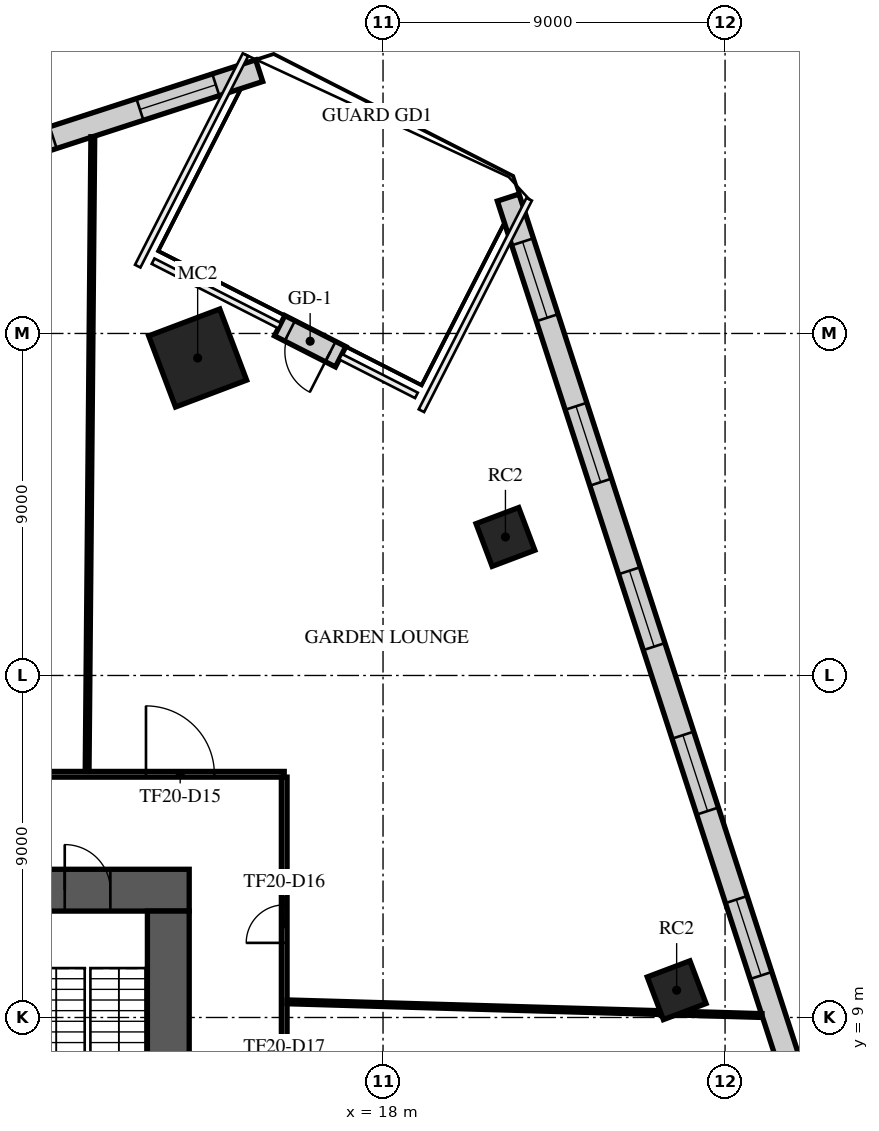
"""IFC4 building model, lengths in metres.
Left out: names, types, materials, properties, quantities, classifications, styles, units other than length and angle.
Written with IfcOpenShell. Run it as: python <this file> out.ifc"""

import sys

from ifc_helpers import new_model, si_unit, direction, frame, frame_2d, origin, origin_2d, place, context, subcontext, project, spatial, rectangle, extrude, element, fill, save


model = new_model("IFC4")
c1 = context("Model", 3, precision=1e-05, world=origin(), true_north=direction((0.0, 1.0)))
c2 = subcontext(c1, "Body", "Model", "MODEL_VIEW")
j1 = project(units=[si_unit("LENGTHUNIT", "METRE"), si_unit("PLANEANGLEUNIT", "RADIAN")], contexts=[c1])
p1 = place(None, origin())
s1 = spatial("IfcSite", under=j1, at=p1, CompositionType="ELEMENT")
p2 = place(p1, origin())
s2 = spatial("IfcBuilding", under=s1, at=p2, CompositionType="ELEMENT")
p3 = place(p2, frame((0.0, 0.0, 90.1)))
s3 = spatial("IfcBuildingStorey", under=s2, at=p3, CompositionType="ELEMENT", Elevation=90.1)
p4 = place(p3, frame((13.122, 26.354, 0.0), z_axis=(0.0, 0.0, 1.0), x_axis=(0.935491525991, 0.353349125935, 0.0)))
e1 = element("IfcColumn", 1, at=p4, inside=s3, PredefinedType="COLUMN", context=c2, shape_type="SweptSolid", body=[
    extrude(rectangle(XDim=2.0, YDim=2.0, at=origin_2d()), origin(), (0.0, 0.0, 1.0), 4.0),
])
for number, where, z_axis, x_axis in (
    (2, (25.726, 9.717, 0.0), (0.0, 0.0, 1.0), (0.935, 0.353, 0.0)),
    (3, (21.221, 21.645, 0.0), (0.0, 0.0, 1.0), (0.935, 0.353, 0.0)),
):
    element("IfcColumn", number, at=place(p3, frame(where, z_axis=z_axis, x_axis=x_axis)), inside=s3, PredefinedType="COLUMN", context=c2, shape_type="SweptSolid", body=[
        extrude(rectangle(XDim=1.2, YDim=1.2, at=origin_2d()), origin(), (0.0, 0.0, 1.0), 4.0),
    ])
p5 = place(p3, frame((-12.9, 12.35, 0.0), z_axis=(0.0, 0.0, 1.0), x_axis=(1.0, 0.0, 0.0)))
e4 = element("IfcWall", 4, at=p5, inside=s3, PredefinedType="SHEAR", context=c2, shape_type="SweptSolid", body=[
    extrude(rectangle(XDim=25.8, YDim=1.1, at=frame_2d((12.9, 0.0))), origin(), (0.0, 0.0, 1.0), 3.58),
])
p6 = place(p5, frame((11.7, 0.0, 0.0)))
e5 = element("IfcOpeningElement", 5, at=p6, cuts=e4, PredefinedType="OPENING", context=c2, shape_type="SweptSolid", body=[
    extrude(rectangle(XDim=2.4, YDim=2.4, at=frame_2d((1.2, 1.2))), frame((0.0, 0.56, 0.0), z_axis=(0.0, -1.0, 0.0), x_axis=(1.0, 0.0, 0.0)), (0.0, 0.0, 1.0), 1.12),
])
p7 = place(p5, frame((22.525, 0.0, 0.0)))
e6 = element("IfcOpeningElement", 6, at=p7, cuts=e4, PredefinedType="OPENING", context=c2, shape_type="SweptSolid", body=[
    extrude(rectangle(XDim=1.2, YDim=2.1, at=frame_2d((0.6, 1.05))), frame((0.0, 0.56, 0.0), z_axis=(0.0, -1.0, 0.0), x_axis=(1.0, 0.0, 0.0)), (0.0, 0.0, 1.0), 1.12),
])
p8 = place(p5, frame((1.5, 0.0, 0.0)))
e7 = element("IfcOpeningElement", 7, at=p8, cuts=e4, PredefinedType="OPENING", context=c2, shape_type="SweptSolid", body=[
    extrude(rectangle(XDim=1.0, YDim=2.1, at=frame_2d((0.5, 1.05))), frame((0.0, 0.56, 0.0), z_axis=(0.0, -1.0, 0.0), x_axis=(1.0, 0.0, 0.0)), (0.0, 0.0, 1.0), 1.12),
])
p9 = place(p3, frame((12.35, -11.8, 0.0), z_axis=(0.0, 0.0, 1.0), x_axis=(0.0, 1.0, 0.0)))
e8 = element("IfcWall", 8, at=p9, inside=s3, PredefinedType="SHEAR", context=c2, shape_type="SweptSolid", body=[
    extrude(rectangle(XDim=23.6, YDim=1.1, at=frame_2d((11.8, 0.0))), origin(), (0.0, 0.0, 1.0), 3.58),
])
p10 = place(p9, frame((10.6, 0.0, 0.0)))
e9 = element("IfcOpeningElement", 9, at=p10, cuts=e8, PredefinedType="OPENING", context=c2, shape_type="SweptSolid", body=[
    extrude(rectangle(XDim=2.4, YDim=2.4, at=frame_2d((1.2, 1.2))), frame((0.0, 0.56, 0.0), z_axis=(0.0, -1.0, 0.0), x_axis=(1.0, 0.0, 0.0)), (0.0, 0.0, 1.0), 1.12),
])
p11 = place(p3, frame((14.741, 33.915, 0.0), z_axis=(0.0, 0.0, 1.0), x_axis=(-0.951056049788, -0.309018430131, 0.0)))
e10 = element("IfcWall", 10, at=p11, inside=s3, PredefinedType="STANDARD", context=c2, shape_type="SweptSolid", body=[
    extrude(rectangle(XDim=49.376, YDim=0.6, at=frame_2d((24.688, 0.0))), origin(), (0.0, 0.0, 1.0), 3.58),
])
p12 = place(p11, frame((1.2, 0.0, 0.9)))
e11 = element("IfcOpeningElement", 11, at=p12, cuts=e10, PredefinedType="OPENING", context=c2, shape_type="SweptSolid", body=[
    extrude(rectangle(XDim=2.1, YDim=2.1, at=frame_2d((1.05, 1.05))), frame((0.0, 0.31, 0.0), z_axis=(0.0, -1.0, 0.0), x_axis=(1.0, 0.0, 0.0)), (0.0, 0.0, 1.0), 0.62),
])
p13 = place(p11, frame((5.7, 0.0, 0.9)))
e12 = element("IfcOpeningElement", 12, at=p13, cuts=e10, PredefinedType="OPENING", context=c2, shape_type="SweptSolid", body=[
    extrude(rectangle(XDim=2.1, YDim=2.1, at=frame_2d((1.05, 1.05))), frame((0.0, 0.31, 0.0), z_axis=(0.0, -1.0, 0.0), x_axis=(1.0, 0.0, 0.0)), (0.0, 0.0, 1.0), 0.62),
])
p14 = place(p11, frame((10.2, 0.0, 0.9)))
e13 = element("IfcOpeningElement", 13, at=p14, cuts=e10, PredefinedType="OPENING", context=c2, shape_type="SweptSolid", body=[
    extrude(rectangle(XDim=2.1, YDim=2.1, at=frame_2d((1.05, 1.05))), frame((0.0, 0.31, 0.0), z_axis=(0.0, -1.0, 0.0), x_axis=(1.0, 0.0, 0.0)), (0.0, 0.0, 1.0), 0.62),
])
p15 = place(p11, frame((14.7, 0.0, 0.9)))
e14 = element("IfcOpeningElement", 14, at=p15, cuts=e10, PredefinedType="OPENING", context=c2, shape_type="SweptSolid", body=[
    extrude(rectangle(XDim=2.1, YDim=2.1, at=frame_2d((1.05, 1.05))), frame((0.0, 0.31, 0.0), z_axis=(0.0, -1.0, 0.0), x_axis=(1.0, 0.0, 0.0)), (0.0, 0.0, 1.0), 0.62),
])
p16 = place(p11, frame((19.2, 0.0, 0.9)))
e15 = element("IfcOpeningElement", 15, at=p16, cuts=e10, PredefinedType="OPENING", context=c2, shape_type="SweptSolid", body=[
    extrude(rectangle(XDim=2.1, YDim=2.1, at=frame_2d((1.05, 1.05))), frame((0.0, 0.31, 0.0), z_axis=(0.0, -1.0, 0.0), x_axis=(1.0, 0.0, 0.0)), (0.0, 0.0, 1.0), 0.62),
])
p17 = place(p11, frame((23.7, 0.0, 0.9)))
e16 = element("IfcOpeningElement", 16, at=p17, cuts=e10, PredefinedType="OPENING", context=c2, shape_type="SweptSolid", body=[
    extrude(rectangle(XDim=2.1, YDim=2.1, at=frame_2d((1.05, 1.05))), frame((0.0, 0.31, 0.0), z_axis=(0.0, -1.0, 0.0), x_axis=(1.0, 0.0, 0.0)), (0.0, 0.0, 1.0), 0.62),
])
p18 = place(p11, frame((28.2, 0.0, 0.9)))
e17 = element("IfcOpeningElement", 17, at=p18, cuts=e10, PredefinedType="OPENING", context=c2, shape_type="SweptSolid", body=[
    extrude(rectangle(XDim=2.1, YDim=2.1, at=frame_2d((1.05, 1.05))), frame((0.0, 0.31, 0.0), z_axis=(0.0, -1.0, 0.0), x_axis=(1.0, 0.0, 0.0)), (0.0, 0.0, 1.0), 0.62),
])
p19 = place(p11, frame((32.7, 0.0, 0.9)))
e18 = element("IfcOpeningElement", 18, at=p19, cuts=e10, PredefinedType="OPENING", context=c2, shape_type="SweptSolid", body=[
    extrude(rectangle(XDim=2.1, YDim=2.1, at=frame_2d((1.05, 1.05))), frame((0.0, 0.31, 0.0), z_axis=(0.0, -1.0, 0.0), x_axis=(1.0, 0.0, 0.0)), (0.0, 0.0, 1.0), 0.62),
])
p20 = place(p11, frame((37.2, 0.0, 0.9)))
e19 = element("IfcOpeningElement", 19, at=p20, cuts=e10, PredefinedType="OPENING", context=c2, shape_type="SweptSolid", body=[
    extrude(rectangle(XDim=2.1, YDim=2.1, at=frame_2d((1.05, 1.05))), frame((0.0, 0.31, 0.0), z_axis=(0.0, -1.0, 0.0), x_axis=(1.0, 0.0, 0.0)), (0.0, 0.0, 1.0), 0.62),
])
p21 = place(p11, frame((41.7, 0.0, 0.9)))
e20 = element("IfcOpeningElement", 20, at=p21, cuts=e10, PredefinedType="OPENING", context=c2, shape_type="SweptSolid", body=[
    extrude(rectangle(XDim=2.1, YDim=2.1, at=frame_2d((1.05, 1.05))), frame((0.0, 0.31, 0.0), z_axis=(0.0, -1.0, 0.0), x_axis=(1.0, 0.0, 0.0)), (0.0, 0.0, 1.0), 0.62),
])
p22 = place(p11, frame((46.138, 0.0, 0.9)))
e21 = element("IfcOpeningElement", 21, at=p22, cuts=e10, PredefinedType="OPENING", context=c2, shape_type="SweptSolid", body=[
    extrude(rectangle(XDim=2.1, YDim=2.1, at=frame_2d((1.05, 1.05))), frame((0.0, 0.31, 0.0), z_axis=(0.0, -1.0, 0.0), x_axis=(1.0, 0.0, 0.0)), (0.0, 0.0, 1.0), 0.62),
])
p23 = place(p3, frame((35.315, -12.578, 0.0), z_axis=(0.0, 0.0, 1.0), x_axis=(-0.30901806374, 0.951056168837, 0.0)))
e22 = element("IfcWall", 22, at=p23, inside=s3, PredefinedType="STANDARD", context=c2, shape_type="SweptSolid", body=[
    extrude(rectangle(XDim=45.376, YDim=0.6, at=frame_2d((22.688, 0.0))), origin(), (0.0, 0.0, 1.0), 3.58),
])
p24 = place(p23, frame((1.163, 0.0, 0.9)))
e23 = element("IfcOpeningElement", 23, at=p24, cuts=e22, PredefinedType="OPENING", context=c2, shape_type="SweptSolid", body=[
    extrude(rectangle(XDim=2.1, YDim=2.1, at=frame_2d((1.05, 1.05))), frame((0.0, 0.31, 0.0), z_axis=(0.0, -1.0, 0.0), x_axis=(1.0, 0.0, 0.0)), (0.0, 0.0, 1.0), 0.62),
])
p25 = place(p23, frame((5.651, 0.0, 0.9)))
e24 = element("IfcOpeningElement", 24, at=p25, cuts=e22, PredefinedType="OPENING", context=c2, shape_type="SweptSolid", body=[
    extrude(rectangle(XDim=2.1, YDim=2.1, at=frame_2d((1.05, 1.05))), frame((0.0, 0.31, 0.0), z_axis=(0.0, -1.0, 0.0), x_axis=(1.0, 0.0, 0.0)), (0.0, 0.0, 1.0), 0.62),
])
p26 = place(p23, frame((10.201, 0.0, 0.9)))
e25 = element("IfcOpeningElement", 25, at=p26, cuts=e22, PredefinedType="OPENING", context=c2, shape_type="SweptSolid", body=[
    extrude(rectangle(XDim=2.1, YDim=2.1, at=frame_2d((1.05, 1.05))), frame((0.0, 0.31, 0.0), z_axis=(0.0, -1.0, 0.0), x_axis=(1.0, 0.0, 0.0)), (0.0, 0.0, 1.0), 0.62),
])
p27 = place(p23, frame((14.751, 0.0, 0.9)))
e26 = element("IfcOpeningElement", 26, at=p27, cuts=e22, PredefinedType="OPENING", context=c2, shape_type="SweptSolid", body=[
    extrude(rectangle(XDim=2.1, YDim=2.1, at=frame_2d((1.05, 1.05))), frame((0.0, 0.31, 0.0), z_axis=(0.0, -1.0, 0.0), x_axis=(1.0, 0.0, 0.0)), (0.0, 0.0, 1.0), 0.62),
])
p28 = place(p23, frame((19.301, 0.0, 0.9)))
e27 = element("IfcOpeningElement", 27, at=p28, cuts=e22, PredefinedType="OPENING", context=c2, shape_type="SweptSolid", body=[
    extrude(rectangle(XDim=2.1, YDim=2.1, at=frame_2d((1.05, 1.05))), frame((0.0, 0.31, 0.0), z_axis=(0.0, -1.0, 0.0), x_axis=(1.0, 0.0, 0.0)), (0.0, 0.0, 1.0), 0.62),
])
p29 = place(p23, frame((23.851, 0.0, 0.9)))
e28 = element("IfcOpeningElement", 28, at=p29, cuts=e22, PredefinedType="OPENING", context=c2, shape_type="SweptSolid", body=[
    extrude(rectangle(XDim=2.1, YDim=2.1, at=frame_2d((1.05, 1.05))), frame((0.0, 0.31, 0.0), z_axis=(0.0, -1.0, 0.0), x_axis=(1.0, 0.0, 0.0)), (0.0, 0.0, 1.0), 0.62),
])
p30 = place(p23, frame((28.401, 0.0, 0.9)))
e29 = element("IfcOpeningElement", 29, at=p30, cuts=e22, PredefinedType="OPENING", context=c2, shape_type="SweptSolid", body=[
    extrude(rectangle(XDim=2.1, YDim=2.1, at=frame_2d((1.05, 1.05))), frame((0.0, 0.31, 0.0), z_axis=(0.0, -1.0, 0.0), x_axis=(1.0, 0.0, 0.0)), (0.0, 0.0, 1.0), 0.62),
])
p31 = place(p23, frame((32.951, 0.0, 0.9)))
e30 = element("IfcOpeningElement", 30, at=p31, cuts=e22, PredefinedType="OPENING", context=c2, shape_type="SweptSolid", body=[
    extrude(rectangle(XDim=2.1, YDim=2.1, at=frame_2d((1.05, 1.05))), frame((0.0, 0.31, 0.0), z_axis=(0.0, -1.0, 0.0), x_axis=(1.0, 0.0, 0.0)), (0.0, 0.0, 1.0), 0.62),
])
p32 = place(p23, frame((37.501, 0.0, 0.9)))
e31 = element("IfcOpeningElement", 31, at=p32, cuts=e22, PredefinedType="OPENING", context=c2, shape_type="SweptSolid", body=[
    extrude(rectangle(XDim=2.1, YDim=2.1, at=frame_2d((1.05, 1.05))), frame((0.0, 0.31, 0.0), z_axis=(0.0, -1.0, 0.0), x_axis=(1.0, 0.0, 0.0)), (0.0, 0.0, 1.0), 0.62),
])
p33 = place(p23, frame((42.051, 0.0, 0.9)))
e32 = element("IfcOpeningElement", 32, at=p33, cuts=e22, PredefinedType="OPENING", context=c2, shape_type="SweptSolid", body=[
    extrude(rectangle(XDim=2.1, YDim=2.1, at=frame_2d((1.05, 1.05))), frame((0.0, 0.31, 0.0), z_axis=(0.0, -1.0, 0.0), x_axis=(1.0, 0.0, 0.0)), (0.0, 0.0, 1.0), 0.62),
])
p34 = place(p3, frame((16.884, 26.387, 0.0), z_axis=(0.0, 0.0, 1.0), x_axis=(-0.891010511763, 0.453982673599, 0.0)))
e33 = element("IfcWall", 33, at=p34, inside=s3, PredefinedType="STANDARD", context=c2, shape_type="SweptSolid", body=[
    extrude(rectangle(XDim=1.8, YDim=0.6, at=frame_2d((0.9, 0.0))), origin(), (0.0, 0.0, 1.0), 3.58),
])
p35 = place(p34, frame((0.3, 0.0, 0.0)))
e34 = element("IfcOpeningElement", 34, at=p35, cuts=e33, PredefinedType="OPENING", context=c2, shape_type="SweptSolid", body=[
    extrude(rectangle(XDim=1.2, YDim=2.4, at=frame_2d((0.6, 1.2))), frame((0.0, 0.31, 0.0), z_axis=(0.0, -1.0, 0.0), x_axis=(1.0, 0.0, 0.0)), (0.0, 0.0, 1.0), 0.62),
])
p36 = place(p3, frame((-15.325, 15.4, 0.0), z_axis=(0.0, 0.0, 1.0), x_axis=(1.0, 0.0, 0.0)))
e35 = element("IfcWall", 35, at=p36, inside=s3, PredefinedType="PARTITIONING", context=c2, shape_type="SweptSolid", body=[
    extrude(rectangle(XDim=30.725, YDim=0.15, at=frame_2d((15.362, 0.0))), origin(), (0.0, 0.0, 1.0), 3.08),
])
p37 = place(p36, frame((2.55, 0.0, 0.0)))
e36 = element("IfcOpeningElement", 36, at=p37, cuts=e35, PredefinedType="OPENING", context=c2, shape_type="SweptSolid", body=[
    extrude(rectangle(XDim=1.8, YDim=2.1, at=frame_2d((0.9, 1.05))), frame((0.0, 0.085, 0.0), z_axis=(0.0, -1.0, 0.0), x_axis=(1.0, 0.0, 0.0)), (0.0, 0.0, 1.0), 0.17),
])
p38 = place(p36, frame((7.98, 0.0, 0.0)))
e37 = element("IfcOpeningElement", 37, at=p38, cuts=e35, PredefinedType="OPENING", context=c2, shape_type="SweptSolid", body=[
    extrude(rectangle(XDim=1.0, YDim=2.1, at=frame_2d((0.5, 1.05))), frame((0.0, 0.085, 0.0), z_axis=(0.0, -1.0, 0.0), x_axis=(1.0, 0.0, 0.0)), (0.0, 0.0, 1.0), 0.17),
])
p39 = place(p36, frame((15.935, 0.0, 0.0)))
e38 = element("IfcOpeningElement", 38, at=p39, cuts=e35, PredefinedType="OPENING", context=c2, shape_type="SweptSolid", body=[
    extrude(rectangle(XDim=1.0, YDim=2.1, at=frame_2d((0.5, 1.05))), frame((0.0, 0.085, 0.0), z_axis=(0.0, -1.0, 0.0), x_axis=(1.0, 0.0, 0.0)), (0.0, 0.0, 1.0), 0.17),
])
p40 = place(p36, frame((18.934, 0.0, 0.0)))
e39 = element("IfcOpeningElement", 39, at=p40, cuts=e35, PredefinedType="OPENING", context=c2, shape_type="SweptSolid", body=[
    extrude(rectangle(XDim=1.0, YDim=2.1, at=frame_2d((0.5, 1.05))), frame((0.0, 0.085, 0.0), z_axis=(0.0, -1.0, 0.0), x_axis=(1.0, 0.0, 0.0)), (0.0, 0.0, 1.0), 0.17),
])
p41 = place(p36, frame((27.088, 0.0, 0.0)))
e40 = element("IfcOpeningElement", 40, at=p41, cuts=e35, PredefinedType="OPENING", context=c2, shape_type="SweptSolid", body=[
    extrude(rectangle(XDim=1.8, YDim=2.1, at=frame_2d((0.9, 1.05))), frame((0.0, 0.085, 0.0), z_axis=(0.0, -1.0, 0.0), x_axis=(1.0, 0.0, 0.0)), (0.0, 0.0, 1.0), 0.17),
])
p42 = place(p3, frame((15.4, -15.325, 0.0), z_axis=(0.0, 0.0, 1.0), x_axis=(0.0, 1.0, 0.0)))
e41 = element("IfcWall", 41, at=p42, inside=s3, PredefinedType="PARTITIONING", context=c2, shape_type="SweptSolid", body=[
    extrude(rectangle(XDim=30.65, YDim=0.15, at=frame_2d((15.325, 0.0))), origin(), (0.0, 0.0, 1.0), 3.08),
])
p43 = place(p42, frame((26.288, 0.0, 0.0)))
e42 = element("IfcOpeningElement", 42, at=p43, cuts=e41, PredefinedType="OPENING", context=c2, shape_type="SweptSolid", body=[
    extrude(rectangle(XDim=1.0, YDim=2.1, at=frame_2d((0.5, 1.05))), frame((0.0, 0.085, 0.0), z_axis=(0.0, -1.0, 0.0), x_axis=(1.0, 0.0, 0.0)), (0.0, 0.0, 1.0), 0.17),
])
p44 = place(p42, frame((21.949, 0.0, 0.0)))
e43 = element("IfcOpeningElement", 43, at=p44, cuts=e41, PredefinedType="OPENING", context=c2, shape_type="SweptSolid", body=[
    extrude(rectangle(XDim=1.0, YDim=2.1, at=frame_2d((0.5, 1.05))), frame((0.0, 0.085, 0.0), z_axis=(0.0, -1.0, 0.0), x_axis=(1.0, 0.0, 0.0)), (0.0, 0.0, 1.0), 0.17),
])
p45 = place(p42, frame((14.27, 0.0, 0.0)))
e44 = element("IfcOpeningElement", 44, at=p45, cuts=e41, PredefinedType="OPENING", context=c2, shape_type="SweptSolid", body=[
    extrude(rectangle(XDim=1.0, YDim=2.1, at=frame_2d((0.5, 1.05))), frame((0.0, 0.085, 0.0), z_axis=(0.0, -1.0, 0.0), x_axis=(1.0, 0.0, 0.0)), (0.0, 0.0, 1.0), 0.17),
])
p46 = place(p42, frame((6.038, 0.0, 0.0)))
e45 = element("IfcOpeningElement", 45, at=p46, cuts=e41, PredefinedType="OPENING", context=c2, shape_type="SweptSolid", body=[
    extrude(rectangle(XDim=1.8, YDim=2.1, at=frame_2d((0.9, 1.05))), frame((0.0, 0.085, 0.0), z_axis=(0.0, -1.0, 0.0), x_axis=(1.0, 0.0, 0.0)), (0.0, 0.0, 1.0), 0.17),
])
p47 = place(p3, frame((10.214, 15.475, 0.0), z_axis=(0.0, 0.0, 1.0), x_axis=(0.00896123542, 0.999959847324, 0.0)))
e46 = element("IfcWall", 46, at=p47, inside=s3, PredefinedType="PARTITIONING", context=c2, shape_type="SweptSolid", body=[
    extrude(rectangle(XDim=16.701, YDim=0.1, at=frame_2d((8.35, 0.0))), origin(), (0.0, 0.0, 1.0), 2.83),
])
p48 = place(p3, frame((15.476, 9.412, 0.0), z_axis=(0.0, 0.0, 1.0), x_axis=(0.999583865111, -0.028846084817, 0.0)))
e47 = element("IfcWall", 47, at=p48, inside=s3, PredefinedType="PARTITIONING", context=c2, shape_type="SweptSolid", body=[
    extrude(rectangle(XDim=9.835, YDim=0.1, at=frame_2d((4.917, 0.0))), origin(), (0.0, 0.0, 1.0), 2.96),
])
p49 = place(p3, frame((25.826, 9.113, 0.0), z_axis=(0.0, 0.0, 1.0), x_axis=(0.999585375356, -0.028793703742, 0.0)))
e48 = element("IfcWall", 48, at=p49, inside=s3, PredefinedType="PARTITIONING", context=c2, shape_type="SweptSolid", body=[
    extrude(rectangle(XDim=2.145, YDim=0.1, at=frame_2d((1.073, 0.0))), origin(), (0.0, 0.0, 1.0), 2.83),
])
p50 = place(p7, origin())
e49 = element("IfcDoor", 49, at=p50, inside=s3, OperationType="SINGLE_SWING_LEFT", PredefinedType="DOOR", context=c2, shape_type="SweptSolid", body=[
    extrude(rectangle(XDim=1.2, YDim=2.1, at=frame_2d((0.6, 1.05))), frame((0.0, 0.025, 0.0), z_axis=(0.0, -1.0, 0.0), x_axis=(1.0, 0.0, 0.0)), (0.0, 0.0, 1.0), 0.05),
])
fill(e6, e49)
p51 = place(p12, origin())
e50 = element("IfcWindow", 50, at=p51, inside=s3, PartitioningType="SINGLE_PANEL", PredefinedType="WINDOW", context=c2, shape_type="SweptSolid", body=[
    extrude(rectangle(XDim=2.1, YDim=2.1, at=frame_2d((1.05, 1.05))), frame((0.0, 0.03, 0.0), z_axis=(0.0, -1.0, 0.0), x_axis=(1.0, 0.0, 0.0)), (0.0, 0.0, 1.0), 0.06),
])
fill(e11, e50)
p52 = place(p13, origin())
e51 = element("IfcWindow", 51, at=p52, inside=s3, PartitioningType="SINGLE_PANEL", PredefinedType="WINDOW", context=c2, shape_type="SweptSolid", body=[
    extrude(rectangle(XDim=2.1, YDim=2.1, at=frame_2d((1.05, 1.05))), frame((0.0, 0.03, 0.0), z_axis=(0.0, -1.0, 0.0), x_axis=(1.0, 0.0, 0.0)), (0.0, 0.0, 1.0), 0.06),
])
fill(e12, e51)
p53 = place(p29, origin())
e52 = element("IfcWindow", 52, at=p53, inside=s3, PartitioningType="SINGLE_PANEL", PredefinedType="WINDOW", context=c2, shape_type="SweptSolid", body=[
    extrude(rectangle(XDim=2.1, YDim=2.1, at=frame_2d((1.05, 1.05))), frame((0.0, 0.03, 0.0), z_axis=(0.0, -1.0, 0.0), x_axis=(1.0, 0.0, 0.0)), (0.0, 0.0, 1.0), 0.06),
])
fill(e28, e52)
p54 = place(p30, origin())
e53 = element("IfcWindow", 53, at=p54, inside=s3, PartitioningType="SINGLE_PANEL", PredefinedType="WINDOW", context=c2, shape_type="SweptSolid", body=[
    extrude(rectangle(XDim=2.1, YDim=2.1, at=frame_2d((1.05, 1.05))), frame((0.0, 0.03, 0.0), z_axis=(0.0, -1.0, 0.0), x_axis=(1.0, 0.0, 0.0)), (0.0, 0.0, 1.0), 0.06),
])
fill(e29, e53)
p55 = place(p31, origin())
e54 = element("IfcWindow", 54, at=p55, inside=s3, PartitioningType="SINGLE_PANEL", PredefinedType="WINDOW", context=c2, shape_type="SweptSolid", body=[
    extrude(rectangle(XDim=2.1, YDim=2.1, at=frame_2d((1.05, 1.05))), frame((0.0, 0.03, 0.0), z_axis=(0.0, -1.0, 0.0), x_axis=(1.0, 0.0, 0.0)), (0.0, 0.0, 1.0), 0.06),
])
fill(e30, e54)
p56 = place(p32, origin())
e55 = element("IfcWindow", 55, at=p56, inside=s3, PartitioningType="SINGLE_PANEL", PredefinedType="WINDOW", context=c2, shape_type="SweptSolid", body=[
    extrude(rectangle(XDim=2.1, YDim=2.1, at=frame_2d((1.05, 1.05))), frame((0.0, 0.03, 0.0), z_axis=(0.0, -1.0, 0.0), x_axis=(1.0, 0.0, 0.0)), (0.0, 0.0, 1.0), 0.06),
])
fill(e31, e55)
p57 = place(p33, origin())
e56 = element("IfcWindow", 56, at=p57, inside=s3, PartitioningType="SINGLE_PANEL", PredefinedType="WINDOW", context=c2, shape_type="SweptSolid", body=[
    extrude(rectangle(XDim=2.1, YDim=2.1, at=frame_2d((1.05, 1.05))), frame((0.0, 0.03, 0.0), z_axis=(0.0, -1.0, 0.0), x_axis=(1.0, 0.0, 0.0)), (0.0, 0.0, 1.0), 0.06),
])
fill(e32, e56)
p58 = place(p35, origin())
e57 = element("IfcDoor", 57, at=p58, inside=s3, OperationType="SINGLE_SWING_LEFT", PredefinedType="DOOR", context=c2, shape_type="SweptSolid", body=[
    extrude(rectangle(XDim=1.2, YDim=2.4, at=frame_2d((0.6, 1.2))), frame((0.0, 0.025, 0.0), z_axis=(0.0, -1.0, 0.0), x_axis=(1.0, 0.0, 0.0)), (0.0, 0.0, 1.0), 0.05),
])
fill(e34, e57)
p59 = place(p41, origin())
e58 = element("IfcDoor", 58, at=p59, inside=s3, OperationType="DOUBLE_DOOR_SINGLE_SWING", PredefinedType="DOOR", context=c2, shape_type="SweptSolid", body=[
    extrude(rectangle(XDim=1.8, YDim=2.1, at=frame_2d((0.9, 1.05))), frame((0.0, 0.025, 0.0), z_axis=(0.0, -1.0, 0.0), x_axis=(1.0, 0.0, 0.0)), (0.0, 0.0, 1.0), 0.05),
])
fill(e40, e58)
p60 = place(p43, frame((1.0, 0.0, 0.0), z_axis=(0.0, 0.0, 1.0), x_axis=(-1.0, 0.0, 0.0)))
e59 = element("IfcDoor", 59, at=p60, inside=s3, OperationType="SINGLE_SWING_RIGHT", PredefinedType="DOOR", context=c2, shape_type="SweptSolid", body=[
    extrude(rectangle(XDim=1.0, YDim=2.1, at=frame_2d((0.5, 1.05))), frame((0.0, 0.025, 0.0), z_axis=(0.0, -1.0, 0.0), x_axis=(1.0, 0.0, 0.0)), (0.0, 0.0, 1.0), 0.05),
])
fill(e42, e59)
save(model, sys.argv[1])
